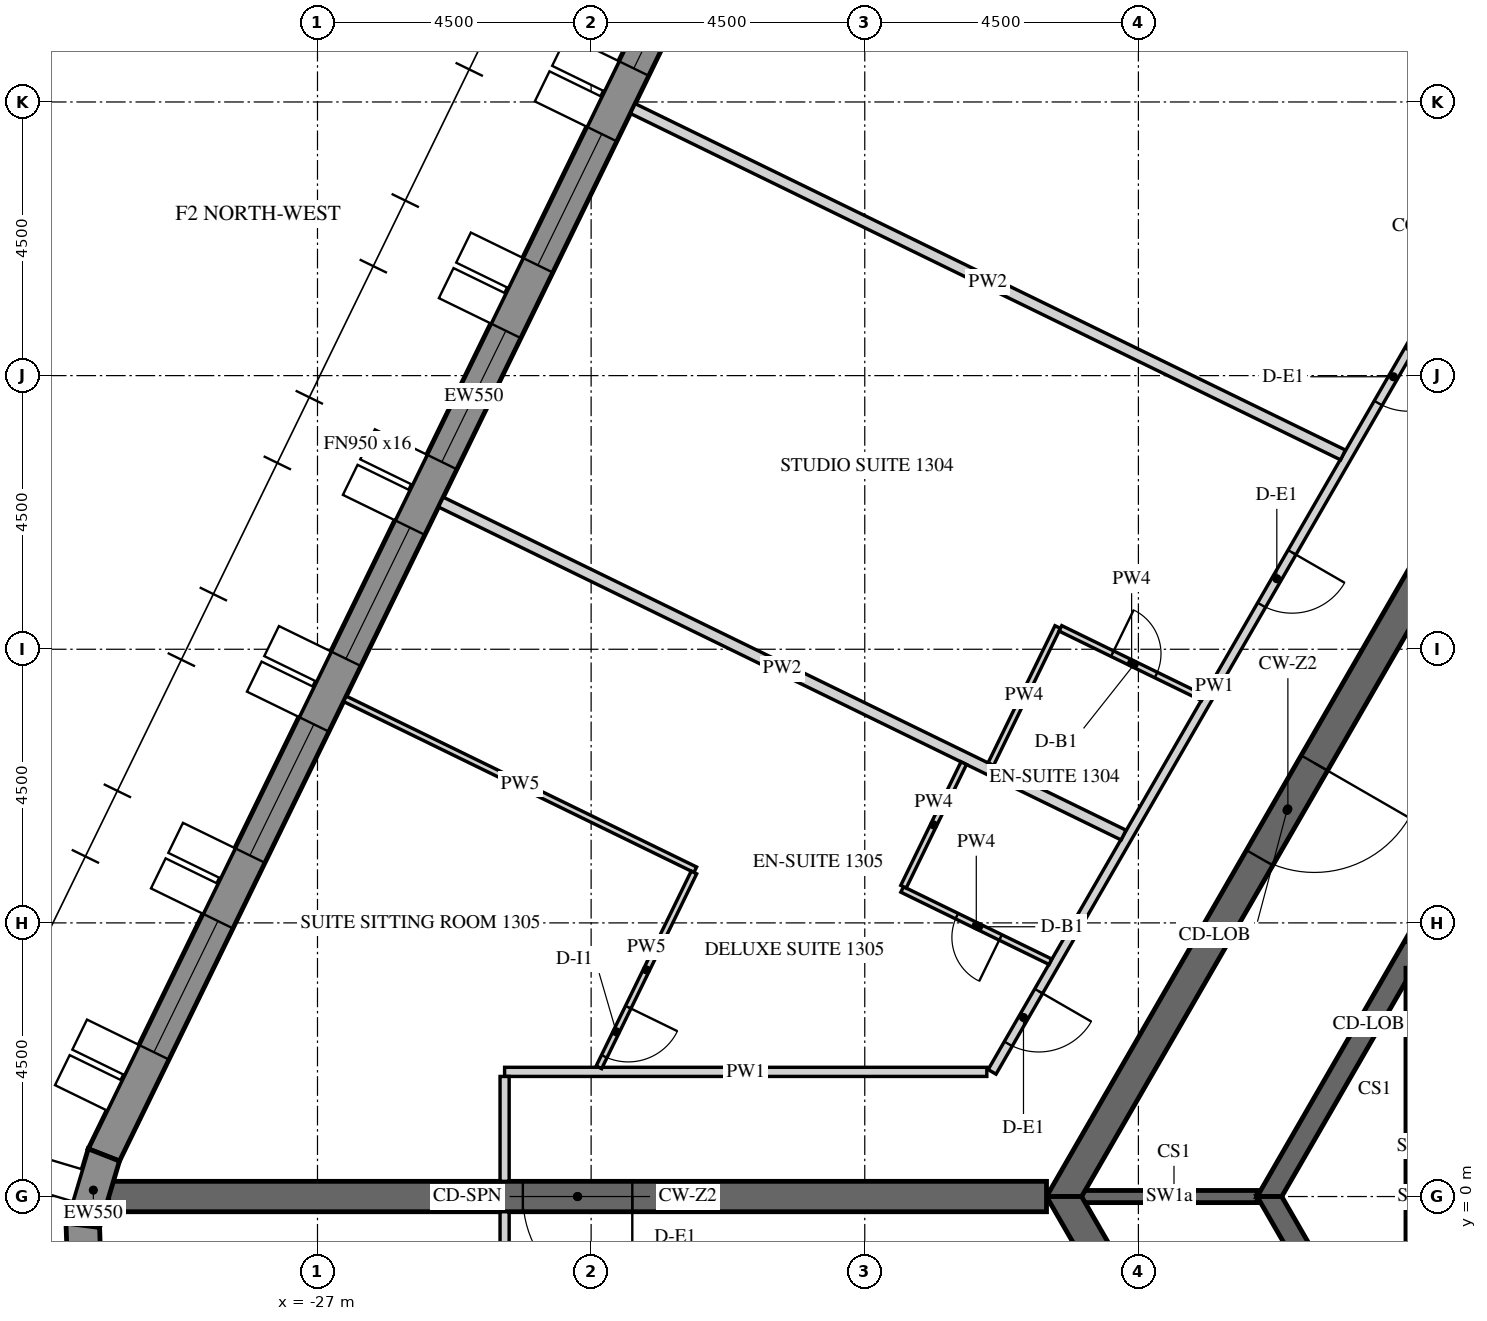
"""IFC4 building model, lengths in metres.
Left out: names, types, materials, properties, quantities, classifications, styles, units other than length and angle.
Written with IfcOpenShell. Run it as: python <this file> out.ifc"""

import sys

from ifc_helpers import new_model, si_unit, direction, frame, frame_2d, origin, place, context, subcontext, project, spatial, polyline, rectangle, outline, extrude, element, fill, save


model = new_model("IFC4")
c1 = context("Model", 3, precision=1e-05, world=origin(), true_north=direction((0.0, 1.0)))
c2 = subcontext(c1, "Body", "Model", "MODEL_VIEW")
j1 = project(units=[si_unit("LENGTHUNIT", "METRE"), si_unit("PLANEANGLEUNIT", "RADIAN")], contexts=[c1])
p1 = place(None, origin())
s1 = spatial("IfcSite", under=j1, at=p1, CompositionType="ELEMENT")
p2 = place(p1, origin())
s2 = spatial("IfcBuilding", under=s1, at=p2, CompositionType="ELEMENT")
p3 = place(p2, frame((0.0, 0.0, 176.1)))
s3 = spatial("IfcBuildingStorey", under=s2, at=p3, CompositionType="ELEMENT", Elevation=176.1)
p4 = place(p3, frame((-18.345, 25.633, -0.15), z_axis=(0.0, 0.0, 1.0), x_axis=(-0.43837181828, -0.898793718791, 0.0)))
e1 = element("IfcWall", 1, at=p4, inside=s3, PredefinedType="SOLIDWALL", context=c2, shape_type="SweptSolid", body=[
    extrude(outline(polyline([(-0.026, -0.275), (27.78, -0.275), (27.735, 0.275), (0.026, 0.275), (-0.026, -0.275)])), origin(), (0.0, 0.0, 1.0), 3.9),
])
p5 = place(p4, frame((1.879, 0.0, 1.05)))
e2 = element("IfcOpeningElement", 2, at=p5, cuts=e1, PredefinedType="OPENING", context=c2, shape_type="SweptSolid", body=[
    extrude(rectangle(XDim=2.4, YDim=2.4, at=frame_2d((1.2, 1.2))), frame((0.0, 0.285, 0.0), z_axis=(0.0, -1.0, 0.0), x_axis=(1.0, 0.0, 0.0)), (0.0, 0.0, 1.0), 0.57),
])
p6 = place(p4, frame((5.479, 0.0, 1.05)))
e3 = element("IfcOpeningElement", 3, at=p6, cuts=e1, PredefinedType="OPENING", context=c2, shape_type="SweptSolid", body=[
    extrude(rectangle(XDim=2.4, YDim=2.4, at=frame_2d((1.2, 1.2))), frame((0.0, 0.285, 0.0), z_axis=(0.0, -1.0, 0.0), x_axis=(1.0, 0.0, 0.0)), (0.0, 0.0, 1.0), 0.57),
])
p7 = place(p4, frame((9.079, 0.0, 1.05)))
e4 = element("IfcOpeningElement", 4, at=p7, cuts=e1, PredefinedType="OPENING", context=c2, shape_type="SweptSolid", body=[
    extrude(rectangle(XDim=2.4, YDim=2.4, at=frame_2d((1.2, 1.2))), frame((0.0, 0.285, 0.0), z_axis=(0.0, -1.0, 0.0), x_axis=(1.0, 0.0, 0.0)), (0.0, 0.0, 1.0), 0.57),
])
p8 = place(p4, frame((12.679, 0.0, 1.05)))
e5 = element("IfcOpeningElement", 5, at=p8, cuts=e1, PredefinedType="OPENING", context=c2, shape_type="SweptSolid", body=[
    extrude(rectangle(XDim=2.4, YDim=2.4, at=frame_2d((1.2, 1.2))), frame((0.0, 0.285, 0.0), z_axis=(0.0, -1.0, 0.0), x_axis=(1.0, 0.0, 0.0)), (0.0, 0.0, 1.0), 0.57),
])
p9 = place(p4, frame((16.279, 0.0, 1.05)))
e6 = element("IfcOpeningElement", 6, at=p9, cuts=e1, PredefinedType="OPENING", context=c2, shape_type="SweptSolid", body=[
    extrude(rectangle(XDim=2.4, YDim=2.4, at=frame_2d((1.2, 1.2))), frame((0.0, 0.285, 0.0), z_axis=(0.0, -1.0, 0.0), x_axis=(1.0, 0.0, 0.0)), (0.0, 0.0, 1.0), 0.57),
])
p10 = place(p4, frame((19.879, 0.0, 1.05)))
e7 = element("IfcOpeningElement", 7, at=p10, cuts=e1, PredefinedType="OPENING", context=c2, shape_type="SweptSolid", body=[
    extrude(rectangle(XDim=2.4, YDim=2.4, at=frame_2d((1.2, 1.2))), frame((0.0, 0.285, 0.0), z_axis=(0.0, -1.0, 0.0), x_axis=(1.0, 0.0, 0.0)), (0.0, 0.0, 1.0), 0.57),
])
p11 = place(p4, frame((23.479, 0.0, 1.05)))
e8 = element("IfcOpeningElement", 8, at=p11, cuts=e1, PredefinedType="OPENING", context=c2, shape_type="SweptSolid", body=[
    extrude(rectangle(XDim=2.4, YDim=2.4, at=frame_2d((1.2, 1.2))), frame((0.0, 0.285, 0.0), z_axis=(0.0, -1.0, 0.0), x_axis=(1.0, 0.0, 0.0)), (0.0, 0.0, 1.0), 0.57),
])
p12 = place(p3, frame((-30.513, 0.684, -0.15), z_axis=(0.0, 0.0, 1.0), x_axis=(-0.286736058109, -0.958009620505, 0.0)))
e9 = element("IfcWall", 9, at=p12, inside=s3, PredefinedType="SOLIDWALL", context=c2, shape_type="SweptSolid", body=[
    extrude(outline(polyline([(-0.022, -0.275), (1.253, -0.275), (1.163, 0.275), (0.022, 0.275), (-0.022, -0.275)])), origin(), (0.0, 0.0, 1.0), 3.9),
])
p13 = place(p3, frame((-30.86, -0.473, -0.15), z_axis=(0.0, 0.0, 1.0), x_axis=(0.03495638276, -0.999388838893, 0.0)))
e10 = element("IfcWall", 10, at=p13, inside=s3, PredefinedType="SOLIDWALL", context=c2, shape_type="SweptSolid", body=[
    extrude(outline(polyline([(-0.045, -0.275), (1.253, -0.275), (1.163, 0.275), (0.045, 0.275), (-0.045, -0.275)])), origin(), (0.0, 0.0, 1.0), 3.9),
])
p14 = place(p3, frame((-7.361, 12.75, -0.15), z_axis=(0.0, 0.0, 1.0), x_axis=(-0.50000571537, -0.866022103989, 0.0)))
e11 = element("IfcWall", 11, at=p14, inside=s3, PredefinedType="SHEAR", context=c2, shape_type="SweptSolid", body=[
    extrude(outline(polyline([(-0.144, -0.25), (14.867, -0.25), (14.578, 0.25), (0.144, 0.25), (-0.144, -0.25)])), origin(), (0.0, 0.0, 1.0), 3.9),
])
p15 = place(p14, frame((6.49, 0.0, 0.15)))
e12 = element("IfcOpeningElement", 12, at=p15, cuts=e11, PredefinedType="OPENING", context=c2, shape_type="SweptSolid", body=[
    extrude(rectangle(XDim=1.8, YDim=2.4, at=frame_2d((0.9, 1.2))), frame((0.0, 0.26, 0.0), z_axis=(0.0, -1.0, 0.0), x_axis=(1.0, 0.0, 0.0)), (0.0, 0.0, 1.0), 0.52),
])
p16 = place(p3, frame((-14.722, 0.0, -0.15), z_axis=(0.0, 0.0, 1.0), x_axis=(0.50000571537, -0.866022103989, 0.0)))
e13 = element("IfcWall", 13, at=p16, inside=s3, PredefinedType="SHEAR", context=c2, shape_type="SweptSolid", body=[
    extrude(outline(polyline([(-0.144, -0.25), (14.867, -0.25), (14.578, 0.25), (0.144, 0.25), (-0.144, -0.25)])), origin(), (0.0, 0.0, 1.0), 3.9),
])
p17 = place(p16, frame((6.432, 0.0, 0.15)))
e14 = element("IfcOpeningElement", 14, at=p17, cuts=e13, PredefinedType="OPENING", context=c2, shape_type="SweptSolid", body=[
    extrude(rectangle(XDim=1.8, YDim=2.4, at=frame_2d((0.9, 1.2))), frame((0.0, 0.26, 0.0), z_axis=(0.0, -1.0, 0.0), x_axis=(1.0, 0.0, 0.0)), (0.0, 0.0, 1.0), 0.52),
])
p18 = place(p3, frame((-15.011, 0.0, -0.15), z_axis=(0.0, 0.0, 1.0), x_axis=(-1.0, 0.0, 0.0)))
e15 = element("IfcWall", 15, at=p18, inside=s3, PredefinedType="SHEAR", context=c2, shape_type="SweptSolid", body=[
    extrude(rectangle(XDim=15.424, YDim=0.5, at=frame_2d((7.712, 0.0))), origin(), (0.0, 0.0, 1.0), 3.9),
])
p19 = place(p18, frame((6.812, 0.0, 0.15)))
e16 = element("IfcOpeningElement", 16, at=p19, cuts=e15, PredefinedType="OPENING", context=c2, shape_type="SweptSolid", body=[
    extrude(rectangle(XDim=1.8, YDim=2.4, at=frame_2d((0.9, 1.2))), frame((0.0, 0.26, 0.0), z_axis=(0.0, -1.0, 0.0), x_axis=(1.0, 0.0, 0.0)), (0.0, 0.0, 1.0), 0.52),
])
p20 = place(p3, frame((-5.673, 9.825, -0.15), z_axis=(0.0, 0.0, 1.0), x_axis=(-0.499995046907, -0.866028263435, 0.0)))
e17 = element("IfcWall", 17, at=p20, inside=s3, PredefinedType="SHEAR", context=c2, shape_type="SweptSolid", body=[
    extrude(outline(polyline([(-0.101, -0.175), (11.446, -0.175), (11.244, 0.175), (0.101, 0.175), (-0.101, -0.175)])), origin(), (0.0, 0.0, 1.0), 3.9),
])
p21 = place(p20, frame((4.801, 0.0, 0.15)))
e18 = element("IfcOpeningElement", 18, at=p21, cuts=e17, PredefinedType="OPENING", context=c2, shape_type="SweptSolid", body=[
    extrude(rectangle(XDim=1.8, YDim=2.4, at=frame_2d((0.9, 1.2))), frame((0.0, 0.185, 0.0), z_axis=(0.0, -1.0, 0.0), x_axis=(1.0, 0.0, 0.0)), (0.0, 0.0, 1.0), 0.37),
])
p22 = place(p3, frame((-11.345, 0.0, -0.15), z_axis=(0.0, 0.0, 1.0), x_axis=(0.499995046907, -0.866028263435, 0.0)))
e19 = element("IfcWall", 19, at=p22, inside=s3, PredefinedType="SHEAR", context=c2, shape_type="SweptSolid", body=[
    extrude(outline(polyline([(-0.101, -0.175), (11.446, -0.175), (11.244, 0.175), (0.101, 0.175), (-0.101, -0.175)])), origin(), (0.0, 0.0, 1.0), 3.9),
])
p23 = place(p22, frame((4.744, 0.0, 0.15)))
e20 = element("IfcOpeningElement", 20, at=p23, cuts=e19, PredefinedType="OPENING", context=c2, shape_type="SweptSolid", body=[
    extrude(rectangle(XDim=1.8, YDim=2.4, at=frame_2d((0.9, 1.2))), frame((0.0, 0.185, 0.0), z_axis=(0.0, -1.0, 0.0), x_axis=(1.0, 0.0, 0.0)), (0.0, 0.0, 1.0), 0.37),
])
p24 = place(p3, frame((-11.547, 0.0, -0.15), z_axis=(0.0, 0.0, 1.0), x_axis=(-1.0, 0.0, 0.0)))
e21 = element("IfcWall", 21, at=p24, inside=s3, PredefinedType="SHEAR", context=c2, shape_type="SweptSolid", body=[
    extrude(rectangle(XDim=2.887, YDim=0.2, at=frame_2d((1.443, 0.0))), origin(), (0.0, 0.0, 1.0), 3.9),
])
p25 = place(p3, frame((-8.975, -3.755, -0.25), z_axis=(0.0, 0.0, 1.0), x_axis=(0.0, 1.0, 0.0)))
e22 = element("IfcWall", 22, at=p25, inside=s3, PredefinedType="SHEAR", context=c2, shape_type="SweptSolid", body=[
    extrude(rectangle(XDim=7.51, YDim=0.25, at=frame_2d((3.755, 0.0))), origin(), (0.0, 0.0, 1.0), 3.9),
])
p26 = place(p3, frame((-8.588, 14.725, 0.0), z_axis=(0.0, 0.0, 1.0), x_axis=(-0.499996322767, -0.866027526826, 0.0)))
e23 = element("IfcWall", 23, at=p26, inside=s3, PredefinedType="PARTITIONING", context=c2, shape_type="SweptSolid", body=[
    extrude(rectangle(XDim=14.636, YDim=0.15, at=frame_2d((7.318, 0.0))), origin(), (0.0, 0.0, 1.0), 2.988),
])
p27 = place(p26, frame((0.936, 0.0, 0.0)))
e24 = element("IfcOpeningElement", 24, at=p27, cuts=e23, PredefinedType="OPENING", context=c2, shape_type="SweptSolid", body=[
    extrude(rectangle(XDim=1.0, YDim=2.1, at=frame_2d((0.5, 1.05))), frame((0.0, 0.085, 0.0), z_axis=(0.0, -1.0, 0.0), x_axis=(1.0, 0.0, 0.0)), (0.0, 0.0, 1.0), 0.17),
])
p28 = place(p26, frame((4.771, 0.0, 0.0)))
e25 = element("IfcOpeningElement", 25, at=p28, cuts=e23, PredefinedType="OPENING", context=c2, shape_type="SweptSolid", body=[
    extrude(rectangle(XDim=1.0, YDim=2.1, at=frame_2d((0.5, 1.05))), frame((0.0, 0.085, 0.0), z_axis=(0.0, -1.0, 0.0), x_axis=(1.0, 0.0, 0.0)), (0.0, 0.0, 1.0), 0.17),
])
p29 = place(p26, frame((13.103, 0.0, 0.0)))
e26 = element("IfcOpeningElement", 26, at=p29, cuts=e23, PredefinedType="OPENING", context=c2, shape_type="SweptSolid", body=[
    extrude(rectangle(XDim=1.0, YDim=2.1, at=frame_2d((0.5, 1.05))), frame((0.0, 0.085, 0.0), z_axis=(0.0, -1.0, 0.0), x_axis=(1.0, 0.0, 0.0)), (0.0, 0.0, 1.0), 0.17),
])
p30 = place(p3, frame((-15.993, 2.05, 0.0), z_axis=(0.0, 0.0, 1.0), x_axis=(-1.0, 0.0, 0.0)))
e27 = element("IfcWall", 27, at=p30, inside=s3, PredefinedType="PARTITIONING", context=c2, shape_type="SweptSolid", body=[
    extrude(rectangle(XDim=7.93, YDim=0.15, at=frame_2d((3.965, 0.0))), origin(), (0.0, 0.0, 1.0), 2.988),
])
p31 = place(p3, frame((-23.923, 1.975, 0.0), z_axis=(0.0, 0.0, 1.0), x_axis=(0.0, -1.0, 0.0)))
e28 = element("IfcWall", 28, at=p31, inside=s3, PredefinedType="PARTITIONING", context=c2, shape_type="SweptSolid", body=[
    extrude(rectangle(XDim=1.725, YDim=0.15, at=frame_2d((0.863, 0.0))), origin(), (0.0, 0.0, 1.0), 2.988),
])
p32 = place(p3, frame((-23.923, -0.25, 0.0), z_axis=(0.0, 0.0, 1.0), x_axis=(0.0, -1.0, 0.0)))
e29 = element("IfcWall", 29, at=p32, inside=s3, PredefinedType="PARTITIONING", context=c2, shape_type="SweptSolid", body=[
    extrude(rectangle(XDim=1.8, YDim=0.15, at=frame_2d((0.9, 0.0))), origin(), (0.0, 0.0, 1.0), 2.988),
])
p33 = place(p3, frame((-21.815, 17.892, 0.0), z_axis=(0.0, 0.0, 1.0), x_axis=(0.898798778742, -0.43836144371, 0.0)))
e30 = element("IfcWall", 30, at=p33, inside=s3, PredefinedType="PARTITIONING", context=c2, shape_type="SweptSolid", body=[
    extrude(rectangle(XDim=12.994, YDim=0.18, at=frame_2d((6.497, 0.0))), origin(), (0.0, 0.0, 1.0), 2.988),
])
p34 = place(p3, frame((-15.927, 7.11, 0.0), z_axis=(0.0, 0.0, 1.0), x_axis=(0.438398718232, 0.898780598284, 0.0)))
e31 = element("IfcWall", 31, at=p34, inside=s3, PredefinedType="PARTITIONING", context=c2, shape_type="SweptSolid", body=[
    extrude(rectangle(XDim=2.51, YDim=0.1, at=frame_2d((1.255, 0.0))), origin(), (0.0, 0.0, 1.0), 2.988),
])
p35 = place(p3, frame((-14.782, 9.344, 0.0), z_axis=(0.0, 0.0, 1.0), x_axis=(0.898770247069, -0.438419939081, 0.0)))
e32 = element("IfcWall", 32, at=p35, inside=s3, PredefinedType="PARTITIONING", context=c2, shape_type="SweptSolid", body=[
    extrude(rectangle(XDim=2.605, YDim=0.1, at=frame_2d((1.302, 0.0))), origin(), (0.0, 0.0, 1.0), 2.988),
])
p36 = place(p35, frame((0.95, 0.0, 0.0)))
e33 = element("IfcOpeningElement", 33, at=p36, cuts=e32, PredefinedType="OPENING", context=c2, shape_type="SweptSolid", body=[
    extrude(rectangle(XDim=0.8, YDim=2.1, at=frame_2d((0.4, 1.05))), frame((0.0, 0.06, 0.0), z_axis=(0.0, -1.0, 0.0), x_axis=(1.0, 0.0, 0.0)), (0.0, 0.0, 1.0), 0.12),
])
p37 = place(p3, frame((-24.971, 11.42, 0.0), z_axis=(0.0, 0.0, 1.0), x_axis=(0.898796996421, -0.438365098091, 0.0)))
e34 = element("IfcWall", 34, at=p37, inside=s3, PredefinedType="PARTITIONING", context=c2, shape_type="SweptSolid", body=[
    extrude(rectangle(XDim=12.491, YDim=0.18, at=frame_2d((6.246, 0.0))), origin(), (0.0, 0.0, 1.0), 2.988),
])
p38 = place(p3, frame((-14.947, 3.861, 0.0), z_axis=(0.0, 0.0, 1.0), x_axis=(-0.898811693159, 0.438334963517, 0.0)))
e35 = element("IfcWall", 35, at=p38, inside=s3, PredefinedType="PARTITIONING", context=c2, shape_type="SweptSolid", body=[
    extrude(rectangle(XDim=2.712, YDim=0.1, at=frame_2d((1.356, 0.0))), origin(), (0.0, 0.0, 1.0), 2.988),
])
p39 = place(p38, frame((0.913, 0.0, 0.0)))
e36 = element("IfcOpeningElement", 36, at=p39, cuts=e35, PredefinedType="OPENING", context=c2, shape_type="SweptSolid", body=[
    extrude(rectangle(XDim=0.8, YDim=2.1, at=frame_2d((0.4, 1.05))), frame((0.0, 0.06, 0.0), z_axis=(0.0, -1.0, 0.0), x_axis=(1.0, 0.0, 0.0)), (0.0, 0.0, 1.0), 0.12),
])
p40 = place(p3, frame((-17.363, 5.095, 0.0), z_axis=(0.0, 0.0, 1.0), x_axis=(0.438334246956, 0.898812042613, 0.0)))
e37 = element("IfcWall", 37, at=p40, inside=s3, PredefinedType="PARTITIONING", context=c2, shape_type="SweptSolid", body=[
    extrude(rectangle(XDim=2.26, YDim=0.1, at=frame_2d((1.13, 0.0))), origin(), (0.0, 0.0, 1.0), 2.988),
])
p41 = place(p3, frame((-26.549, 8.185, 0.0), z_axis=(0.0, 0.0, 1.0), x_axis=(0.898793698528, -0.438371859826, 0.0)))
e38 = element("IfcWall", 38, at=p41, inside=s3, PredefinedType="PARTITIONING", context=c2, shape_type="SweptSolid", body=[
    extrude(rectangle(XDim=6.411, YDim=0.1, at=frame_2d((3.206, 0.0))), origin(), (0.0, 0.0, 1.0), 2.988),
])
p42 = place(p3, frame((-20.809, 5.329, 0.0), z_axis=(0.0, 0.0, 1.0), x_axis=(-0.438399346839, -0.898780291668, 0.0)))
e39 = element("IfcWall", 39, at=p42, inside=s3, PredefinedType="PARTITIONING", context=c2, shape_type="SweptSolid", body=[
    extrude(rectangle(XDim=3.565, YDim=0.1, at=frame_2d((1.783, 0.0))), origin(), (0.0, 0.0, 1.0), 2.988),
])
p43 = place(p42, frame((2.465, 0.0, 0.0)))
e40 = element("IfcOpeningElement", 40, at=p43, cuts=e39, PredefinedType="OPENING", context=c2, shape_type="SweptSolid", body=[
    extrude(rectangle(XDim=0.9, YDim=2.1, at=frame_2d((0.45, 1.05))), frame((0.0, 0.06, 0.0), z_axis=(0.0, -1.0, 0.0), x_axis=(1.0, 0.0, 0.0)), (0.0, 0.0, 1.0), 0.12),
])
p44 = place(p6, frame((0.0, 0.205, 0.0)))
e41 = element("IfcWindow", 41, at=p44, inside=s3, PartitioningType="DOUBLE_PANEL_VERTICAL", PredefinedType="WINDOW", context=c2, shape_type="SweptSolid", body=[
    extrude(rectangle(XDim=2.4, YDim=2.4, at=frame_2d((1.2, 1.2))), frame((0.0, 0.03, 0.0), z_axis=(0.0, -1.0, 0.0), x_axis=(1.0, 0.0, 0.0)), (0.0, 0.0, 1.0), 0.06),
])
fill(e3, e41)
p45 = place(p7, frame((0.0, 0.205, 0.0)))
e42 = element("IfcWindow", 42, at=p45, inside=s3, PartitioningType="DOUBLE_PANEL_VERTICAL", PredefinedType="WINDOW", context=c2, shape_type="SweptSolid", body=[
    extrude(rectangle(XDim=2.4, YDim=2.4, at=frame_2d((1.2, 1.2))), frame((0.0, 0.03, 0.0), z_axis=(0.0, -1.0, 0.0), x_axis=(1.0, 0.0, 0.0)), (0.0, 0.0, 1.0), 0.06),
])
fill(e4, e42)
p46 = place(p8, frame((0.0, 0.205, 0.0)))
e43 = element("IfcWindow", 43, at=p46, inside=s3, PartitioningType="DOUBLE_PANEL_VERTICAL", PredefinedType="WINDOW", context=c2, shape_type="SweptSolid", body=[
    extrude(rectangle(XDim=2.4, YDim=2.4, at=frame_2d((1.2, 1.2))), frame((0.0, 0.03, 0.0), z_axis=(0.0, -1.0, 0.0), x_axis=(1.0, 0.0, 0.0)), (0.0, 0.0, 1.0), 0.06),
])
fill(e5, e43)
p47 = place(p9, frame((0.0, 0.205, 0.0)))
e44 = element("IfcWindow", 44, at=p47, inside=s3, PartitioningType="DOUBLE_PANEL_VERTICAL", PredefinedType="WINDOW", context=c2, shape_type="SweptSolid", body=[
    extrude(rectangle(XDim=2.4, YDim=2.4, at=frame_2d((1.2, 1.2))), frame((0.0, 0.03, 0.0), z_axis=(0.0, -1.0, 0.0), x_axis=(1.0, 0.0, 0.0)), (0.0, 0.0, 1.0), 0.06),
])
fill(e6, e44)
p48 = place(p10, frame((0.0, 0.205, 0.0)))
e45 = element("IfcWindow", 45, at=p48, inside=s3, PartitioningType="DOUBLE_PANEL_VERTICAL", PredefinedType="WINDOW", context=c2, shape_type="SweptSolid", body=[
    extrude(rectangle(XDim=2.4, YDim=2.4, at=frame_2d((1.2, 1.2))), frame((0.0, 0.03, 0.0), z_axis=(0.0, -1.0, 0.0), x_axis=(1.0, 0.0, 0.0)), (0.0, 0.0, 1.0), 0.06),
])
fill(e7, e45)
p49 = place(p11, frame((0.0, 0.205, 0.0)))
e46 = element("IfcWindow", 46, at=p49, inside=s3, PartitioningType="DOUBLE_PANEL_VERTICAL", PredefinedType="WINDOW", context=c2, shape_type="SweptSolid", body=[
    extrude(rectangle(XDim=2.4, YDim=2.4, at=frame_2d((1.2, 1.2))), frame((0.0, 0.03, 0.0), z_axis=(0.0, -1.0, 0.0), x_axis=(1.0, 0.0, 0.0)), (0.0, 0.0, 1.0), 0.06),
])
fill(e8, e46)
p50 = place(p15, origin())
e47 = element("IfcDoor", 47, at=p50, inside=s3, OperationType="DOUBLE_DOOR_SINGLE_SWING", PredefinedType="DOOR", context=c2, shape_type="SweptSolid", body=[
    extrude(rectangle(XDim=1.8, YDim=2.4, at=frame_2d((0.9, 1.2))), frame((0.0, 0.025, 0.0), z_axis=(0.0, -1.0, 0.0), x_axis=(1.0, 0.0, 0.0)), (0.0, 0.0, 1.0), 0.05),
])
fill(e12, e47)
p51 = place(p19, origin())
e48 = element("IfcDoor", 48, at=p51, inside=s3, OperationType="DOUBLE_DOOR_SINGLE_SWING", PredefinedType="DOOR", context=c2, shape_type="SweptSolid", body=[
    extrude(rectangle(XDim=1.8, YDim=2.4, at=frame_2d((0.9, 1.2))), frame((0.0, 0.025, 0.0), z_axis=(0.0, -1.0, 0.0), x_axis=(1.0, 0.0, 0.0)), (0.0, 0.0, 1.0), 0.05),
])
fill(e16, e48)
p52 = place(p27, origin())
e49 = element("IfcDoor", 49, at=p52, inside=s3, OperationType="SINGLE_SWING_RIGHT", PredefinedType="DOOR", context=c2, shape_type="SweptSolid", body=[
    extrude(rectangle(XDim=1.0, YDim=2.1, at=frame_2d((0.5, 1.05))), frame((0.0, 0.025, 0.0), z_axis=(0.0, -1.0, 0.0), x_axis=(1.0, 0.0, 0.0)), (0.0, 0.0, 1.0), 0.05),
])
fill(e24, e49)
p53 = place(p28, origin())
e50 = element("IfcDoor", 50, at=p53, inside=s3, OperationType="SINGLE_SWING_LEFT", PredefinedType="DOOR", context=c2, shape_type="SweptSolid", body=[
    extrude(rectangle(XDim=1.0, YDim=2.1, at=frame_2d((0.5, 1.05))), frame((0.0, 0.025, 0.0), z_axis=(0.0, -1.0, 0.0), x_axis=(1.0, 0.0, 0.0)), (0.0, 0.0, 1.0), 0.05),
])
fill(e25, e50)
p54 = place(p36, origin())
e51 = element("IfcDoor", 51, at=p54, inside=s3, OperationType="SINGLE_SWING_LEFT", PredefinedType="DOOR", context=c2, shape_type="SweptSolid", body=[
    extrude(rectangle(XDim=0.8, YDim=2.1, at=frame_2d((0.4, 1.05))), frame((0.0, 0.025, 0.0), z_axis=(0.0, -1.0, 0.0), x_axis=(1.0, 0.0, 0.0)), (0.0, 0.0, 1.0), 0.05),
])
fill(e33, e51)
p55 = place(p29, origin())
e52 = element("IfcDoor", 52, at=p55, inside=s3, OperationType="SINGLE_SWING_LEFT", PredefinedType="DOOR", context=c2, shape_type="SweptSolid", body=[
    extrude(rectangle(XDim=1.0, YDim=2.1, at=frame_2d((0.5, 1.05))), frame((0.0, 0.025, 0.0), z_axis=(0.0, -1.0, 0.0), x_axis=(1.0, 0.0, 0.0)), (0.0, 0.0, 1.0), 0.05),
])
fill(e26, e52)
p56 = place(p39, origin())
e53 = element("IfcDoor", 53, at=p56, inside=s3, OperationType="SINGLE_SWING_RIGHT", PredefinedType="DOOR", context=c2, shape_type="SweptSolid", body=[
    extrude(rectangle(XDim=0.8, YDim=2.1, at=frame_2d((0.4, 1.05))), frame((0.0, 0.025, 0.0), z_axis=(0.0, -1.0, 0.0), x_axis=(1.0, 0.0, 0.0)), (0.0, 0.0, 1.0), 0.05),
])
fill(e36, e53)
p57 = place(p43, origin())
e54 = element("IfcDoor", 54, at=p57, inside=s3, OperationType="SINGLE_SWING_LEFT", PredefinedType="DOOR", context=c2, shape_type="SweptSolid", body=[
    extrude(rectangle(XDim=0.9, YDim=2.1, at=frame_2d((0.45, 1.05))), frame((0.0, 0.025, 0.0), z_axis=(0.0, -1.0, 0.0), x_axis=(1.0, 0.0, 0.0)), (0.0, 0.0, 1.0), 0.05),
])
fill(e40, e54)
save(model, sys.argv[1])
